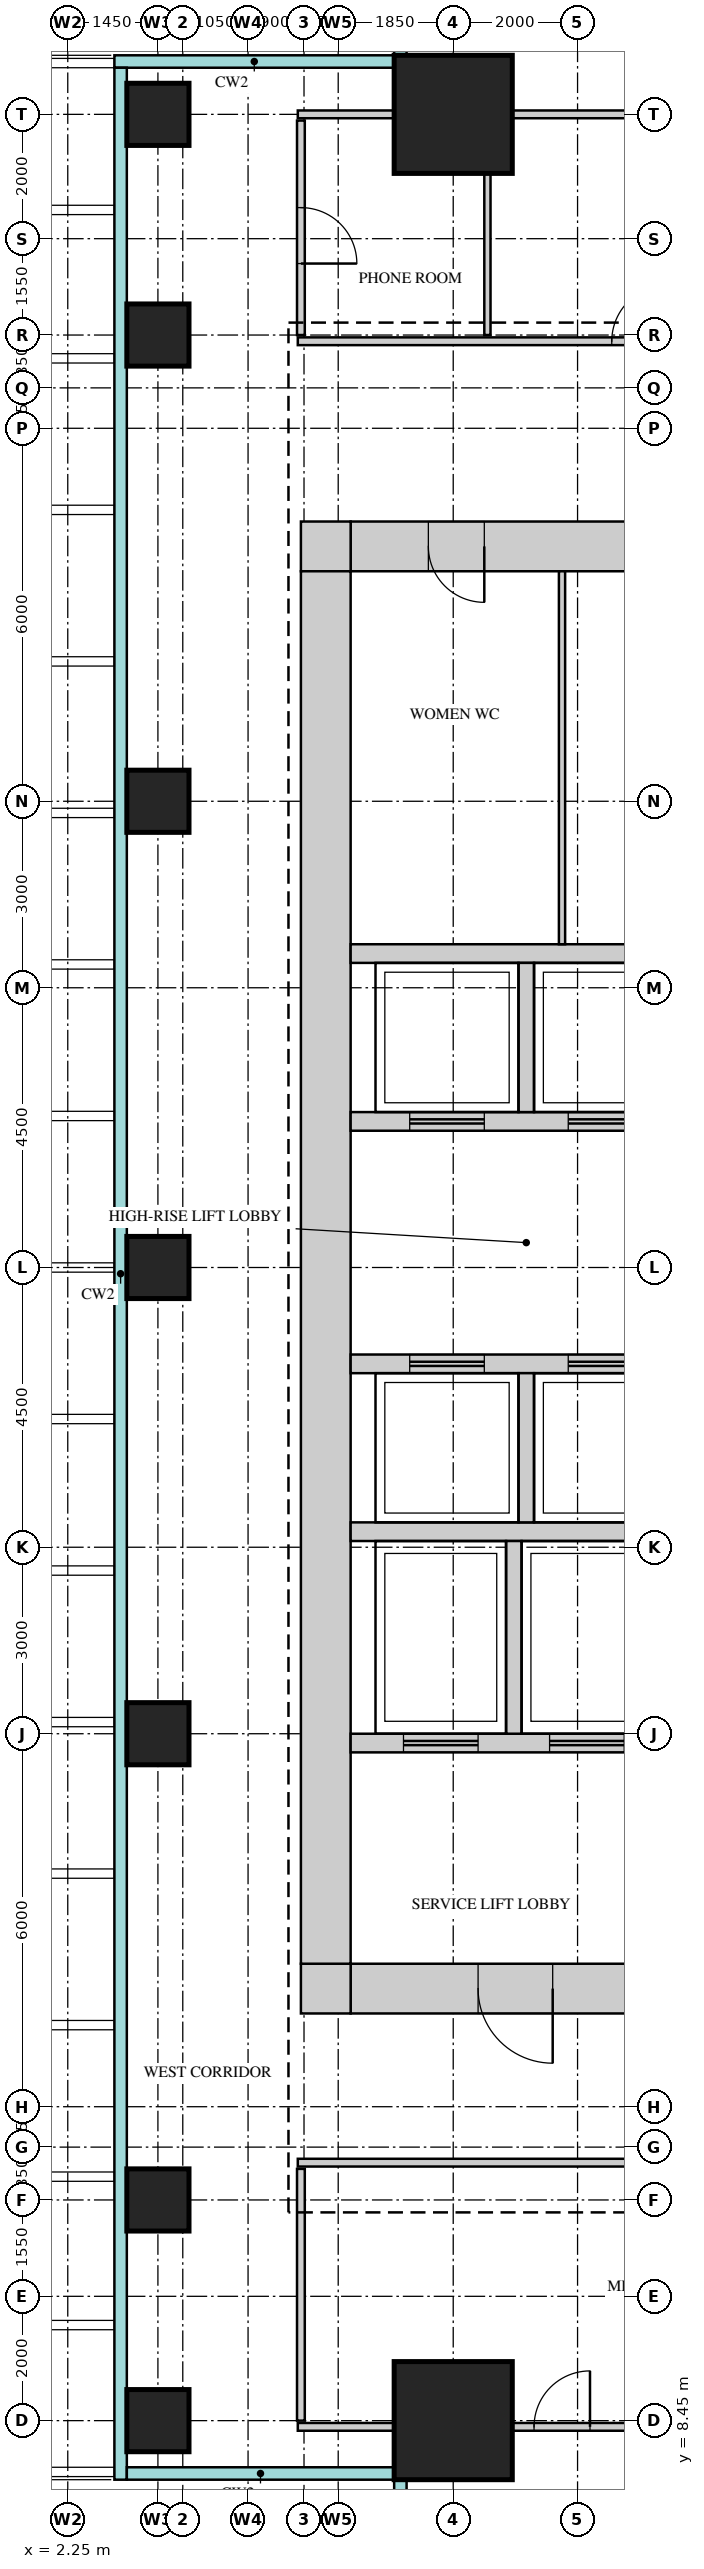
"""IFC4 building model, lengths in metres.
Left out: names, types, materials, properties, quantities, classifications, styles, units other than length and angle.
Written with IfcOpenShell. Run it as: python <this file> out.ifc"""

import sys

from ifc_helpers import new_model, si_unit, direction, frame, frame_2d, origin, origin_2d, place, context, subcontext, project, spatial, rectangle, extrude, source, transform, mapped, element, fill, save


model = new_model("IFC4")
c1 = context("Model", 3, precision=1e-05, world=origin(), true_north=direction((0.0, 1.0)))
c2 = subcontext(c1, "Body", "Model", "MODEL_VIEW")
j1 = project(units=[si_unit("LENGTHUNIT", "METRE"), si_unit("PLANEANGLEUNIT", "RADIAN")], contexts=[c1])
p1 = place(None, origin())
s1 = spatial("IfcSite", under=j1, at=p1, CompositionType="ELEMENT")
p2 = place(p1, origin())
s2 = spatial("IfcBuilding", under=s1, at=p2, CompositionType="ELEMENT")
p3 = place(p2, frame((0.0, 0.0, 176.7)))
s3 = spatial("IfcBuildingStorey", under=s2, at=p3, CompositionType="ELEMENT", Elevation=176.7)
m1 = source(origin(), c2, "Body", "SweptSolid", [
    extrude(rectangle(XDim=13.4, YDim=0.8, at=frame_2d((6.7, 0.0))), origin(), (0.0, 0.0, 1.0), 3.75),
])
p4 = place(p3, frame((6.8, 38.6, 0.0), z_axis=(0.0, 0.0, 1.0), x_axis=(1.0, 0.0, 0.0)))
e1 = element("IfcWall", 1, at=p4, inside=s3, PredefinedType="SHEAR", context=c2, shape_type="MappedRepresentation", body=[
    mapped(m1, transform((0.0, 0.0, 0.0))),
])
m2 = source(origin(), c2, "Body", "SweptSolid", [
    extrude(rectangle(XDim=0.9, YDim=2.1, at=frame_2d((0.45, 1.05))), frame((0.0, 0.41, 0.0), z_axis=(0.0, -1.0, 0.0), x_axis=(1.0, 0.0, 0.0)), (0.0, 0.0, 1.0), 0.82),
])
p5 = place(p4, frame((1.25, 0.0, 0.0)))
e2 = element("IfcOpeningElement", 2, at=p5, cuts=e1, PredefinedType="OPENING", context=c2, shape_type="MappedRepresentation", body=[
    mapped(m2, transform((0.0, 0.0, 0.0))),
])
p6 = place(p4, frame((4.65, 0.0, 0.0)))
e3 = element("IfcOpeningElement", 3, at=p6, cuts=e1, PredefinedType="OPENING", context=c2, shape_type="MappedRepresentation", body=[
    mapped(m2, transform((0.0, 0.0, 0.0))),
])
m3 = source(origin(), c2, "Body", "SweptSolid", [
    extrude(rectangle(XDim=1.0, YDim=2.1, at=frame_2d((0.5, 1.05))), frame((0.0, 0.41, 0.0), z_axis=(0.0, -1.0, 0.0), x_axis=(1.0, 0.0, 0.0)), (0.0, 0.0, 1.0), 0.82),
])
p7 = place(p4, frame((8.0, 0.0, 0.0)))
e4 = element("IfcOpeningElement", 4, at=p7, cuts=e1, PredefinedType="OPENING", context=c2, shape_type="MappedRepresentation", body=[
    mapped(m3, transform((0.0, 0.0, 0.0))),
])
p8 = place(p4, frame((11.35, 0.0, 0.0)))
e5 = element("IfcOpeningElement", 5, at=p8, cuts=e1, PredefinedType="OPENING", context=c2, shape_type="MappedRepresentation", body=[
    mapped(m2, transform((0.0, 0.0, 0.0))),
])
m4 = source(origin(), c2, "Body", "SweptSolid", [
    extrude(rectangle(XDim=0.8, YDim=0.8, at=frame_2d((0.4, 0.0))), origin(), (0.0, 0.0, 1.0), 3.75),
])
p9 = place(p3, frame((6.0, 38.6, 0.0), z_axis=(0.0, 0.0, 1.0), x_axis=(1.0, 0.0, 0.0)))
e6 = element("IfcWall", 6, at=p9, inside=s3, PredefinedType="SHEAR", context=c2, shape_type="MappedRepresentation", body=[
    mapped(m4, transform((0.0, 0.0, 0.0))),
])
p10 = place(p3, frame((6.8, 15.4, 0.0), z_axis=(0.0, 0.0, 1.0), x_axis=(1.0, 0.0, 0.0)))
e7 = element("IfcWall", 7, at=p10, inside=s3, PredefinedType="SHEAR", context=c2, shape_type="MappedRepresentation", body=[
    mapped(m1, transform((0.0, 0.0, 0.0))),
])
m5 = source(origin(), c2, "Body", "SweptSolid", [
    extrude(rectangle(XDim=1.2, YDim=2.1, at=frame_2d((0.6, 1.05))), frame((0.0, 0.41, 0.0), z_axis=(0.0, -1.0, 0.0), x_axis=(1.0, 0.0, 0.0)), (0.0, 0.0, 1.0), 0.82),
])
p11 = place(p10, frame((5.4, 0.0, 0.0)))
e8 = element("IfcOpeningElement", 8, at=p11, cuts=e7, PredefinedType="OPENING", context=c2, shape_type="MappedRepresentation", body=[
    mapped(m5, transform((0.0, 0.0, 0.0))),
])
p12 = place(p10, frame((2.05, 0.0, 0.0)))
e9 = element("IfcOpeningElement", 9, at=p12, cuts=e7, PredefinedType="OPENING", context=c2, shape_type="MappedRepresentation", body=[
    mapped(m5, transform((0.0, 0.0, 0.0))),
])
p13 = place(p10, frame((7.9, 0.0, 0.0)))
e10 = element("IfcOpeningElement", 10, at=p13, cuts=e7, PredefinedType="OPENING", context=c2, shape_type="MappedRepresentation", body=[
    mapped(m3, transform((0.0, 0.0, 0.0))),
])
p14 = place(p3, frame((6.0, 15.4, 0.0), z_axis=(0.0, 0.0, 1.0), x_axis=(1.0, 0.0, 0.0)))
e11 = element("IfcWall", 11, at=p14, inside=s3, PredefinedType="SHEAR", context=c2, shape_type="MappedRepresentation", body=[
    mapped(m4, transform((0.0, 0.0, 0.0))),
])
m6 = source(origin(), c2, "Body", "SweptSolid", [
    extrude(rectangle(XDim=22.4, YDim=0.8, at=frame_2d((11.2, 0.0))), origin(), (0.0, 0.0, 1.0), 3.75),
])
p15 = place(p3, frame((6.4, 15.8, 0.0), z_axis=(0.0, 0.0, 1.0), x_axis=(0.0, 1.0, 0.0)))
e12 = element("IfcWall", 12, at=p15, inside=s3, PredefinedType="SHEAR", context=c2, shape_type="MappedRepresentation", body=[
    mapped(m6, transform((0.0, 0.0, 0.0))),
])
m7 = source(origin(), c2, "Body", "SweptSolid", [
    extrude(rectangle(XDim=13.4, YDim=0.3, at=frame_2d((6.7, 0.0))), origin(), (0.0, 0.0, 1.0), 3.75),
])
p16 = place(p3, frame((6.8, 22.75, 0.0), z_axis=(0.0, 0.0, 1.0), x_axis=(1.0, 0.0, 0.0)))
e13 = element("IfcWall", 13, at=p16, inside=s3, PredefinedType="STANDARD", context=c2, shape_type="MappedRepresentation", body=[
    mapped(m7, transform((0.0, 0.0, 0.0))),
])
m8 = source(origin(), c2, "Body", "SweptSolid", [
    extrude(rectangle(XDim=9.275, YDim=0.3, at=frame_2d((4.637, 0.0))), origin(), (0.0, 0.0, 1.0), 3.75),
])
p17 = place(p3, frame((6.8, 19.35, 0.0), z_axis=(0.0, 0.0, 1.0), x_axis=(1.0, 0.0, 0.0)))
e14 = element("IfcWall", 14, at=p17, inside=s3, PredefinedType="STANDARD", context=c2, shape_type="MappedRepresentation", body=[
    mapped(m8, transform((0.0, 0.0, 0.0))),
])
m9 = source(origin(), c2, "Body", "SweptSolid", [
    extrude(rectangle(XDim=1.2, YDim=2.1, at=frame_2d((0.6, 1.05))), frame((0.0, 0.16, 0.0), z_axis=(0.0, -1.0, 0.0), x_axis=(1.0, 0.0, 0.0)), (0.0, 0.0, 1.0), 0.32),
])
p18 = place(p17, frame((0.85, 0.0, 0.0)))
e15 = element("IfcOpeningElement", 15, at=p18, cuts=e14, PredefinedType="OPENING", context=c2, shape_type="MappedRepresentation", body=[
    mapped(m9, transform((0.0, 0.0, 0.0))),
])
p19 = place(p17, frame((3.2, 0.0, 0.0)))
e16 = element("IfcOpeningElement", 16, at=p19, cuts=e14, PredefinedType="OPENING", context=c2, shape_type="MappedRepresentation", body=[
    mapped(m9, transform((0.0, 0.0, 0.0))),
])
p20 = place(p17, frame((5.45, 0.0, 0.0)))
e17 = element("IfcOpeningElement", 17, at=p20, cuts=e14, PredefinedType="OPENING", context=c2, shape_type="MappedRepresentation", body=[
    mapped(m9, transform((0.0, 0.0, 0.0))),
])
p21 = place(p17, frame((7.6, 0.0, 0.0)))
e18 = element("IfcOpeningElement", 18, at=p21, cuts=e14, PredefinedType="OPENING", context=c2, shape_type="MappedRepresentation", body=[
    mapped(m9, transform((0.0, 0.0, 0.0))),
])
p22 = place(p3, frame((6.8, 32.05, 0.0), z_axis=(0.0, 0.0, 1.0), x_axis=(1.0, 0.0, 0.0)))
e19 = element("IfcWall", 19, at=p22, inside=s3, PredefinedType="STANDARD", context=c2, shape_type="MappedRepresentation", body=[
    mapped(m7, transform((0.0, 0.0, 0.0))),
])
p23 = place(p3, frame((6.8, 29.35, 0.0), z_axis=(0.0, 0.0, 1.0), x_axis=(1.0, 0.0, 0.0)))
e20 = element("IfcWall", 20, at=p23, inside=s3, PredefinedType="STANDARD", context=c2, shape_type="MappedRepresentation", body=[
    mapped(m7, transform((0.0, 0.0, 0.0))),
])
p24 = place(p23, frame((0.95, 0.0, 0.0)))
e21 = element("IfcOpeningElement", 21, at=p24, cuts=e20, PredefinedType="OPENING", context=c2, shape_type="MappedRepresentation", body=[
    mapped(m9, transform((0.0, 0.0, 0.0))),
])
p25 = place(p23, frame((3.5, 0.0, 0.0)))
e22 = element("IfcOpeningElement", 22, at=p25, cuts=e20, PredefinedType="OPENING", context=c2, shape_type="MappedRepresentation", body=[
    mapped(m9, transform((0.0, 0.0, 0.0))),
])
p26 = place(p23, frame((6.05, 0.0, 0.0)))
e23 = element("IfcOpeningElement", 23, at=p26, cuts=e20, PredefinedType="OPENING", context=c2, shape_type="MappedRepresentation", body=[
    mapped(m9, transform((0.0, 0.0, 0.0))),
])
p27 = place(p23, frame((8.6, 0.0, 0.0)))
e24 = element("IfcOpeningElement", 24, at=p27, cuts=e20, PredefinedType="OPENING", context=c2, shape_type="MappedRepresentation", body=[
    mapped(m9, transform((0.0, 0.0, 0.0))),
])
p28 = place(p23, frame((11.15, 0.0, 0.0)))
e25 = element("IfcOpeningElement", 25, at=p28, cuts=e20, PredefinedType="OPENING", context=c2, shape_type="MappedRepresentation", body=[
    mapped(m9, transform((0.0, 0.0, 0.0))),
])
p29 = place(p3, frame((6.8, 25.45, 0.0), z_axis=(0.0, 0.0, 1.0), x_axis=(1.0, 0.0, 0.0)))
e26 = element("IfcWall", 26, at=p29, inside=s3, PredefinedType="STANDARD", context=c2, shape_type="MappedRepresentation", body=[
    mapped(m7, transform((0.0, 0.0, 0.0))),
])
p30 = place(p29, frame((0.95, 0.0, 0.0)))
e27 = element("IfcOpeningElement", 27, at=p30, cuts=e26, PredefinedType="OPENING", context=c2, shape_type="MappedRepresentation", body=[
    mapped(m9, transform((0.0, 0.0, 0.0))),
])
p31 = place(p29, frame((3.5, 0.0, 0.0)))
e28 = element("IfcOpeningElement", 28, at=p31, cuts=e26, PredefinedType="OPENING", context=c2, shape_type="MappedRepresentation", body=[
    mapped(m9, transform((0.0, 0.0, 0.0))),
])
p32 = place(p29, frame((6.05, 0.0, 0.0)))
e29 = element("IfcOpeningElement", 29, at=p32, cuts=e26, PredefinedType="OPENING", context=c2, shape_type="MappedRepresentation", body=[
    mapped(m9, transform((0.0, 0.0, 0.0))),
])
p33 = place(p29, frame((8.6, 0.0, 0.0)))
e30 = element("IfcOpeningElement", 30, at=p33, cuts=e26, PredefinedType="OPENING", context=c2, shape_type="MappedRepresentation", body=[
    mapped(m9, transform((0.0, 0.0, 0.0))),
])
p34 = place(p29, frame((11.15, 0.0, 0.0)))
e31 = element("IfcOpeningElement", 31, at=p34, cuts=e26, PredefinedType="OPENING", context=c2, shape_type="MappedRepresentation", body=[
    mapped(m9, transform((0.0, 0.0, 0.0))),
])
m10 = source(origin(), c2, "Body", "SweptSolid", [
    extrude(rectangle(XDim=3.1, YDim=0.25, at=frame_2d((1.55, 0.0))), origin(), (0.0, 0.0, 1.0), 3.75),
])
p35 = place(p3, frame((9.425, 19.5, 0.0), z_axis=(0.0, 0.0, 1.0), x_axis=(0.0, 1.0, 0.0)))
e32 = element("IfcWall", 32, at=p35, inside=s3, PredefinedType="STANDARD", context=c2, shape_type="MappedRepresentation", body=[
    mapped(m10, transform((0.0, 0.0, 0.0))),
])
m11 = source(origin(), c2, "Body", "SweptSolid", [
    extrude(rectangle(XDim=2.4, YDim=0.25, at=frame_2d((1.2, 0.0))), origin(), (0.0, 0.0, 1.0), 3.75),
])
p36 = place(p3, frame((9.625, 29.5, 0.0), z_axis=(0.0, 0.0, 1.0), x_axis=(0.0, 1.0, 0.0)))
e33 = element("IfcWall", 33, at=p36, inside=s3, PredefinedType="STANDARD", context=c2, shape_type="MappedRepresentation", body=[
    mapped(m11, transform((0.0, 0.0, 0.0))),
])
m12 = source(origin(), c2, "Body", "SweptSolid", [
    extrude(rectangle(XDim=2.4, YDim=0.25, at=frame_2d((1.2, 0.0))), origin(), (0.0, 0.0, 1.0), 3.75),
])
p37 = place(p3, frame((9.625, 22.9, 0.0), z_axis=(0.0, 0.0, 1.0), x_axis=(0.0, 1.0, 0.0)))
e34 = element("IfcWall", 34, at=p37, inside=s3, PredefinedType="STANDARD", context=c2, shape_type="MappedRepresentation", body=[
    mapped(m12, transform((0.0, 0.0, 0.0))),
])
m13 = source(origin(), c2, "Body", "SweptSolid", [
    extrude(rectangle(XDim=1.9, YDim=1.9, at=origin_2d()), origin(), (0.0, 0.0, 1.0), 4.0),
])
for number, where, z_axis, x_axis in (
    (35, (8.45, 45.55, 0.0), (0.0, 0.0, 1.0), (1.0, 0.0, 0.0)),
    (36, (8.45, 8.45, 0.0), (0.0, 0.0, 1.0), (1.0, 0.0, 0.0)),
):
    element("IfcColumn", number, at=place(p3, frame(where, z_axis=z_axis, x_axis=x_axis)), inside=s3, PredefinedType="COLUMN", context=c2, shape_type="MappedRepresentation", body=[
        mapped(m13, transform((0.0, 0.0, 0.0))),
    ])
m14 = source(origin(), c2, "Body", "SweptSolid", [
    extrude(rectangle(XDim=1.0, YDim=1.0, at=origin_2d()), origin(), (0.0, 0.0, 1.0), 3.75),
])
for number, where, z_axis, x_axis in (
    (37, (3.7, 8.45, 0.0), (0.0, 0.0, 1.0), (1.0, 0.0, 0.0)),
    (38, (3.7, 12.0, 0.0), (0.0, 0.0, 1.0), (1.0, 0.0, 0.0)),
    (39, (3.7, 19.5, 0.0), (0.0, 0.0, 1.0), (1.0, 0.0, 0.0)),
    (40, (3.7, 27.0, 0.0), (0.0, 0.0, 1.0), (1.0, 0.0, 0.0)),
    (41, (3.7, 34.5, 0.0), (0.0, 0.0, 1.0), (1.0, 0.0, 0.0)),
    (42, (3.7, 42.0, 0.0), (0.0, 0.0, 1.0), (1.0, 0.0, 0.0)),
    (43, (3.7, 45.55, 0.0), (0.0, 0.0, 1.0), (1.0, 0.0, 0.0)),
):
    element("IfcColumn", number, at=place(p3, frame(where, z_axis=z_axis, x_axis=x_axis)), inside=s3, PredefinedType="COLUMN", context=c2, shape_type="MappedRepresentation", body=[
        mapped(m14, transform((0.0, 0.0, 0.0))),
    ])
m15 = source(origin(), c2, "Body", "SweptSolid", [
    extrude(rectangle(XDim=7.95, YDim=0.125, at=frame_2d((3.975, 0.0))), origin(), (0.0, 0.0, 1.0), 3.25),
])
p38 = place(p3, frame((5.95, 8.35, 0.0), z_axis=(0.0, 0.0, 1.0), x_axis=(1.0, 0.0, 0.0)))
e44 = element("IfcWall", 44, at=p38, inside=s3, PredefinedType="PARTITIONING", context=c2, shape_type="MappedRepresentation", body=[
    mapped(m15, transform((0.0, 0.0, 0.0))),
])
m16 = source(origin(), c2, "Body", "SweptSolid", [
    extrude(rectangle(XDim=0.9, YDim=2.1, at=frame_2d((0.45, 1.05))), frame((0.0, 0.073, 0.0), z_axis=(0.0, -1.0, 0.0), x_axis=(1.0, 0.0, 0.0)), (0.0, 0.0, 1.0), 0.145),
])
p39 = place(p38, frame((3.8, 0.0, 0.0)))
e45 = element("IfcOpeningElement", 45, at=p39, cuts=e44, PredefinedType="OPENING", context=c2, shape_type="MappedRepresentation", body=[
    mapped(m16, transform((0.0, 0.0, 0.0))),
])
m17 = source(origin(), c2, "Body", "SweptSolid", [
    extrude(rectangle(XDim=4.05, YDim=0.125, at=frame_2d((2.025, 0.0))), origin(), (0.0, 0.0, 1.0), 3.8),
])
p40 = place(p3, frame((6.0, 8.45, 0.0), z_axis=(0.0, 0.0, 1.0), x_axis=(0.0, 1.0, 0.0)))
e46 = element("IfcWall", 46, at=p40, inside=s3, PredefinedType="PARTITIONING", context=c2, shape_type="MappedRepresentation", body=[
    mapped(m17, transform((0.0, 0.0, 0.0))),
])
m18 = source(origin(), c2, "Body", "SweptSolid", [
    extrude(rectangle(XDim=8.0, YDim=0.125, at=frame_2d((4.0, 0.0))), origin(), (0.0, 0.0, 1.0), 3.8),
])
p41 = place(p3, frame((5.95, 12.6, 0.0), z_axis=(0.0, 0.0, 1.0), x_axis=(1.0, 0.0, 0.0)))
e47 = element("IfcWall", 47, at=p41, inside=s3, PredefinedType="PARTITIONING", context=c2, shape_type="MappedRepresentation", body=[
    mapped(m18, transform((0.0, 0.0, 0.0))),
])
m19 = source(origin(), c2, "Body", "SweptSolid", [
    extrude(rectangle(XDim=6.0, YDim=0.1, at=frame_2d((3.0, 0.0))), origin(), (0.0, 0.0, 1.0), 3.8),
])
p42 = place(p3, frame((10.2, 32.2, 0.0), z_axis=(0.0, 0.0, 1.0), x_axis=(0.0, 1.0, 0.0)))
e48 = element("IfcWall", 48, at=p42, inside=s3, PredefinedType="PARTITIONING", context=c2, shape_type="MappedRepresentation", body=[
    mapped(m19, transform((0.0, 0.0, 0.0))),
])
m20 = source(origin(), c2, "Body", "SweptSolid", [
    extrude(rectangle(XDim=7.95, YDim=0.125, at=frame_2d((3.975, 0.0))), origin(), (0.0, 0.0, 1.0), 3.8),
])
p43 = place(p3, frame((5.95, 41.9, 0.0), z_axis=(0.0, 0.0, 1.0), x_axis=(1.0, 0.0, 0.0)))
e49 = element("IfcWall", 49, at=p43, inside=s3, PredefinedType="PARTITIONING", context=c2, shape_type="MappedRepresentation", body=[
    mapped(m20, transform((0.0, 0.0, 0.0))),
])
p44 = place(p43, frame((5.05, 0.0, 0.0)))
e50 = element("IfcOpeningElement", 50, at=p44, cuts=e49, PredefinedType="OPENING", context=c2, shape_type="MappedRepresentation", body=[
    mapped(m16, transform((0.0, 0.0, 0.0))),
])
m21 = source(origin(), c2, "Body", "SweptSolid", [
    extrude(rectangle(XDim=3.45, YDim=0.125, at=frame_2d((1.725, 0.0))), origin(), (0.0, 0.0, 1.0), 3.8),
])
p45 = place(p3, frame((6.0, 42.0, 0.0), z_axis=(0.0, 0.0, 1.0), x_axis=(0.0, 1.0, 0.0)))
e51 = element("IfcWall", 51, at=p45, inside=s3, PredefinedType="PARTITIONING", context=c2, shape_type="MappedRepresentation", body=[
    mapped(m21, transform((0.0, 0.0, 0.0))),
])
p46 = place(p45, frame((1.15, 0.0, 0.0)))
e52 = element("IfcOpeningElement", 52, at=p46, cuts=e51, PredefinedType="OPENING", context=c2, shape_type="MappedRepresentation", body=[
    mapped(m16, transform((0.0, 0.0, 0.0))),
])
m22 = source(origin(), c2, "Body", "SweptSolid", [
    extrude(rectangle(XDim=3.45, YDim=0.1, at=frame_2d((1.725, 0.0))), origin(), (0.0, 0.0, 1.0), 3.8),
])
p47 = place(p3, frame((9.0, 42.0, 0.0), z_axis=(0.0, 0.0, 1.0), x_axis=(0.0, 1.0, 0.0)))
e53 = element("IfcWall", 53, at=p47, inside=s3, PredefinedType="PARTITIONING", context=c2, shape_type="MappedRepresentation", body=[
    mapped(m22, transform((0.0, 0.0, 0.0))),
])
p48 = place(p3, frame((5.95, 45.55, 0.0), z_axis=(0.0, 0.0, 1.0), x_axis=(1.0, 0.0, 0.0)))
e54 = element("IfcWall", 54, at=p48, inside=s3, PredefinedType="PARTITIONING", context=c2, shape_type="MappedRepresentation", body=[
    mapped(m15, transform((0.0, 0.0, 0.0))),
])
m23 = source(origin(), c2, "Body", "SweptSolid", [
    extrude(rectangle(XDim=0.9, YDim=2.1, at=frame_2d((0.45, 1.05))), frame((0.0, 0.35, 0.0), z_axis=(0.0, -1.0, 0.0), x_axis=(1.0, 0.0, 0.0)), (0.0, 0.0, 1.0), 0.7),
])
p49 = place(p5, origin())
e55 = element("IfcDoor", 55, at=p49, inside=s3, OperationType="SINGLE_SWING_RIGHT", PredefinedType="DOOR", context=c2, shape_type="MappedRepresentation", body=[
    mapped(m23, transform((0.0, 0.0, 0.0))),
])
fill(e2, e55)
m24 = source(origin(), c2, "Body", "SweptSolid", [
    extrude(rectangle(XDim=1.2, YDim=2.1, at=frame_2d((0.6, 1.05))), frame((0.0, 0.35, 0.0), z_axis=(0.0, -1.0, 0.0), x_axis=(1.0, 0.0, 0.0)), (0.0, 0.0, 1.0), 0.7),
])
p50 = place(p12, origin())
e56 = element("IfcDoor", 56, at=p50, inside=s3, OperationType="SINGLE_SWING_RIGHT", PredefinedType="DOOR", context=c2, shape_type="MappedRepresentation", body=[
    mapped(m24, transform((0.0, 0.0, 0.0))),
])
fill(e9, e56)
m25 = source(origin(), c2, "Body", "SweptSolid", [
    extrude(rectangle(XDim=0.9, YDim=2.1, at=frame_2d((0.45, 1.05))), frame((0.0, 0.025, 0.0), z_axis=(0.0, -1.0, 0.0), x_axis=(1.0, 0.0, 0.0)), (0.0, 0.0, 1.0), 0.05),
])
p51 = place(p46, origin())
e57 = element("IfcDoor", 57, at=p51, inside=s3, OperationType="SINGLE_SWING_LEFT", PredefinedType="DOOR", context=c2, shape_type="MappedRepresentation", body=[
    mapped(m25, transform((0.0, 0.0, 0.0))),
])
fill(e52, e57)
p52 = place(p44, origin())
e58 = element("IfcDoor", 58, at=p52, inside=s3, OperationType="SINGLE_SWING_LEFT", PredefinedType="DOOR", context=c2, shape_type="MappedRepresentation", body=[
    mapped(m25, transform((0.0, 0.0, 0.0))),
])
fill(e50, e58)
p53 = place(p39, origin())
e59 = element("IfcDoor", 59, at=p53, inside=s3, OperationType="SINGLE_SWING_LEFT", PredefinedType="DOOR", context=c2, shape_type="MappedRepresentation", body=[
    mapped(m25, transform((0.0, 0.0, 0.0))),
])
fill(e45, e59)
m26 = source(origin(), c2, "Body", "SweptSolid", [
    extrude(rectangle(XDim=1.2, YDim=2.1, at=frame_2d((0.6, 1.05))), frame((0.0, 0.025, 0.0), z_axis=(0.0, -1.0, 0.0), x_axis=(1.0, 0.0, 0.0)), (0.0, 0.0, 1.0), 0.05),
])
p54 = place(p30, origin())
e60 = element("IfcDoor", 60, at=p54, inside=s3, OperationType="DOUBLE_DOOR_SLIDING", PredefinedType="DOOR", context=c2, shape_type="MappedRepresentation", body=[
    mapped(m26, transform((0.0, 0.0, 0.0))),
])
fill(e27, e60)
p55 = place(p31, origin())
e61 = element("IfcDoor", 61, at=p55, inside=s3, OperationType="DOUBLE_DOOR_SLIDING", PredefinedType="DOOR", context=c2, shape_type="MappedRepresentation", body=[
    mapped(m26, transform((0.0, 0.0, 0.0))),
])
fill(e28, e61)
p56 = place(p24, origin())
e62 = element("IfcDoor", 62, at=p56, inside=s3, OperationType="DOUBLE_DOOR_SLIDING", PredefinedType="DOOR", context=c2, shape_type="MappedRepresentation", body=[
    mapped(m26, transform((0.0, 0.0, 0.0))),
])
fill(e21, e62)
p57 = place(p25, origin())
e63 = element("IfcDoor", 63, at=p57, inside=s3, OperationType="DOUBLE_DOOR_SLIDING", PredefinedType="DOOR", context=c2, shape_type="MappedRepresentation", body=[
    mapped(m26, transform((0.0, 0.0, 0.0))),
])
fill(e22, e63)
p58 = place(p18, origin())
e64 = element("IfcDoor", 64, at=p58, inside=s3, OperationType="DOUBLE_DOOR_SLIDING", PredefinedType="DOOR", context=c2, shape_type="MappedRepresentation", body=[
    mapped(m26, transform((0.0, 0.0, 0.0))),
])
fill(e15, e64)
p59 = place(p19, origin())
e65 = element("IfcDoor", 65, at=p59, inside=s3, OperationType="DOUBLE_DOOR_SLIDING", PredefinedType="DOOR", context=c2, shape_type="MappedRepresentation", body=[
    mapped(m26, transform((0.0, 0.0, 0.0))),
])
fill(e16, e65)
save(model, sys.argv[1])
